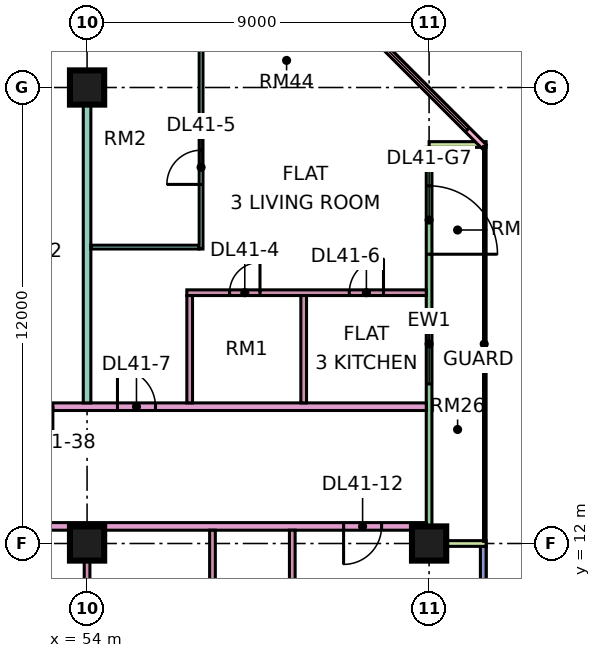
"""IFC4 building model, lengths in metres.
Left out: names, types, materials, properties, quantities, classifications, styles, units other than length and angle.
Written with IfcOpenShell. Run it as: python <this file> out.ifc"""

import sys

from ifc_helpers import new_model, si_unit, direction, frame, frame_2d, origin, origin_2d, place, context, subcontext, project, spatial, rectangle, extrude, element, fill, save


model = new_model("IFC4")
c1 = context("Model", 3, precision=1e-05, world=origin(), true_north=direction((0.0, 1.0)))
c2 = subcontext(c1, "Body", "Model", "MODEL_VIEW")
j1 = project(units=[si_unit("LENGTHUNIT", "METRE"), si_unit("PLANEANGLEUNIT", "RADIAN")], contexts=[c1])
p1 = place(None, origin())
s1 = spatial("IfcSite", under=j1, at=p1, CompositionType="ELEMENT")
p2 = place(p1, origin())
s2 = spatial("IfcBuilding", under=s1, at=p2, CompositionType="ELEMENT")
p3 = place(p2, frame((0.0, 0.0, 179.9)))
s3 = spatial("IfcBuildingStorey", under=s2, at=p3, CompositionType="ELEMENT", Elevation=179.9)
for number, where, z_axis, x_axis in (
    (1, (54.0, 12.0, 0.0), (0.0, 0.0, 1.0), (1.0, 0.0, 0.0)),
    (2, (54.0, 24.0, 0.0), (0.0, 0.0, 1.0), (1.0, 0.0, 0.0)),
    (3, (63.0, 12.0, 0.0), (0.0, 0.0, 1.0), (1.0, 0.0, 0.0)),
):
    element("IfcColumn", number, at=place(p3, frame(where, z_axis=z_axis, x_axis=x_axis)), inside=s3, PredefinedType="COLUMN", context=c2, shape_type="SweptSolid", body=[
        extrude(rectangle(XDim=0.9, YDim=0.9, at=origin_2d()), origin(), (0.0, 0.0, 1.0), 3.75),
    ])
p4 = place(p3, frame((64.425, 1.5, 0.0), z_axis=(0.0, 0.0, 1.0), x_axis=(0.0, 1.0, 0.0)))
e4 = element("IfcWall", 4, at=p4, inside=s3, PredefinedType="SOLIDWALL", context=c2, shape_type="SweptSolid", body=[
    extrude(rectangle(XDim=10.425, YDim=0.15, at=frame_2d((5.212, 0.0))), origin(), (0.0, 0.0, 1.0), 3.35),
])
p5 = place(p4, frame((0.75, 0.0, 0.45)))
e5 = element("IfcOpeningElement", 5, at=p5, cuts=e4, PredefinedType="OPENING", context=c2, shape_type="SweptSolid", body=[
    extrude(rectangle(XDim=3.0, YDim=2.4, at=frame_2d((1.5, 1.2))), frame((0.0, 0.085, 0.0), z_axis=(0.0, -1.0, 0.0), x_axis=(1.0, 0.0, 0.0)), (0.0, 0.0, 1.0), 0.17),
])
p6 = place(p3, frame((63.0, 12.075, 0.0), z_axis=(0.0, 0.0, 1.0), x_axis=(0.0, 1.0, 0.0)))
e6 = element("IfcWall", 6, at=p6, inside=s3, PredefinedType="SOLIDWALL", context=c2, shape_type="SweptSolid", body=[
    extrude(rectangle(XDim=10.35, YDim=0.15, at=frame_2d((5.175, 0.0))), origin(), (0.0, 0.0, 1.0), 3.35),
])
p7 = place(p6, frame((4.125, 0.0, 0.45)))
e7 = element("IfcOpeningElement", 7, at=p7, cuts=e6, PredefinedType="OPENING", context=c2, shape_type="SweptSolid", body=[
    extrude(rectangle(XDim=1.8, YDim=2.4, at=frame_2d((0.9, 1.2))), frame((0.0, 0.085, 0.0), z_axis=(0.0, -1.0, 0.0), x_axis=(1.0, 0.0, 0.0)), (0.0, 0.0, 1.0), 0.17),
])
p8 = place(p6, frame((7.538, 0.0, 0.0)))
e8 = element("IfcOpeningElement", 8, at=p8, cuts=e6, PredefinedType="OPENING", context=c2, shape_type="SweptSolid", body=[
    extrude(rectangle(XDim=1.8, YDim=2.4, at=frame_2d((0.9, 1.2))), frame((0.0, 0.085, 0.0), z_axis=(0.0, -1.0, 0.0), x_axis=(1.0, 0.0, 0.0)), (0.0, 0.0, 1.0), 0.17),
])
for number, where, z_axis, x_axis in (
    (9, (64.5, 12.0, 0.0), (0.0, 0.0, 1.0), (-1.0, 0.0, 0.0)),
    (10, (64.5, 22.5, 0.0), (0.0, 0.0, 1.0), (-1.0, 0.0, 0.0)),
):
    element("IfcWall", number, at=place(p3, frame(where, z_axis=z_axis, x_axis=x_axis)), inside=s3, PredefinedType="SOLIDWALL", context=c2, shape_type="SweptSolid", body=[
        extrude(rectangle(XDim=1.5, YDim=0.15, at=frame_2d((0.75, 0.0))), origin(), (0.0, 0.0, 1.0), 3.35),
    ])
p9 = place(p3, frame((64.447, 22.447, 0.0), z_axis=(0.0, 0.0, 1.0), x_axis=(-0.707106781187, 0.707106781187, 0.0)))
e11 = element("IfcWall", 11, at=p9, inside=s3, PredefinedType="SOLIDWALL", context=c2, shape_type="SweptSolid", body=[
    extrude(rectangle(XDim=4.243, YDim=0.15, at=frame_2d((2.121, 0.0))), origin(), (0.0, 0.0, 1.0), 3.35),
])
p10 = place(p9, frame((0.621, 0.0, 0.45)))
e12 = element("IfcOpeningElement", 12, at=p10, cuts=e11, PredefinedType="OPENING", context=c2, shape_type="SweptSolid", body=[
    extrude(rectangle(XDim=3.0, YDim=2.4, at=frame_2d((1.5, 1.2))), frame((0.0, 0.085, 0.0), z_axis=(0.0, -1.0, 0.0), x_axis=(1.0, 0.0, 0.0)), (0.0, 0.0, 1.0), 0.17),
])
p11 = place(p3, frame((40.65, 12.45, 0.0), z_axis=(0.0, 0.0, 1.0), x_axis=(1.0, 0.0, 0.0)))
e13 = element("IfcWall", 13, at=p11, inside=s3, PredefinedType="PARTITIONING", context=c2, shape_type="SweptSolid", body=[
    extrude(rectangle(XDim=22.276, YDim=0.2, at=frame_2d((11.138, 0.0))), origin(), (0.0, 0.0, 1.0), 3.35),
])
p12 = place(p11, frame((20.1, 0.0, 0.0)))
e14 = element("IfcOpeningElement", 14, at=p12, cuts=e13, PredefinedType="OPENING", context=c2, shape_type="SweptSolid", body=[
    extrude(rectangle(XDim=1.0, YDim=2.1, at=frame_2d((0.5, 1.05))), frame((0.0, 0.11, 0.0), z_axis=(0.0, -1.0, 0.0), x_axis=(1.0, 0.0, 0.0)), (0.0, 0.0, 1.0), 0.22),
])
p13 = place(p11, frame((1.05, 0.0, 0.0)))
e15 = element("IfcOpeningElement", 15, at=p13, cuts=e13, PredefinedType="OPENING", context=c2, shape_type="SweptSolid", body=[
    extrude(rectangle(XDim=1.0, YDim=2.1, at=frame_2d((0.5, 1.05))), frame((0.0, 0.11, 0.0), z_axis=(0.0, -1.0, 0.0), x_axis=(1.0, 0.0, 0.0)), (0.0, 0.0, 1.0), 0.22),
])
p14 = place(p3, frame((51.225, 15.6, 0.0), z_axis=(0.0, 0.0, 1.0), x_axis=(1.0, 0.0, 0.0)))
e16 = element("IfcWall", 16, at=p14, inside=s3, PredefinedType="PARTITIONING", context=c2, shape_type="SweptSolid", body=[
    extrude(rectangle(XDim=11.701, YDim=0.2, at=frame_2d((5.851, 0.0))), origin(), (0.0, 0.0, 1.0), 3.35),
])
p15 = place(p14, frame((3.575, 0.0, 0.0)))
e17 = element("IfcOpeningElement", 17, at=p15, cuts=e16, PredefinedType="OPENING", context=c2, shape_type="SweptSolid", body=[
    extrude(rectangle(XDim=1.0, YDim=2.1, at=frame_2d((0.5, 1.05))), frame((0.0, 0.11, 0.0), z_axis=(0.0, -1.0, 0.0), x_axis=(1.0, 0.0, 0.0)), (0.0, 0.0, 1.0), 0.22),
])
p16 = place(p14, frame((0.875, 0.0, 0.0)))
e18 = element("IfcOpeningElement", 18, at=p16, cuts=e16, PredefinedType="OPENING", context=c2, shape_type="SweptSolid", body=[
    extrude(rectangle(XDim=1.0, YDim=2.1, at=frame_2d((0.5, 1.05))), frame((0.0, 0.11, 0.0), z_axis=(0.0, -1.0, 0.0), x_axis=(1.0, 0.0, 0.0)), (0.0, 0.0, 1.0), 0.22),
])
p17 = place(p3, frame((54.0, 7.125, 0.0), z_axis=(0.0, 0.0, 1.0), x_axis=(0.0, 1.0, 0.0)))
e19 = element("IfcWall", 19, at=p17, inside=s3, PredefinedType="PARTITIONING", context=c2, shape_type="SweptSolid", body=[
    extrude(rectangle(XDim=5.225, YDim=0.15, at=frame_2d((2.613, 0.0))), origin(), (0.0, 0.0, 1.0), 3.35),
])
p18 = place(p3, frame((54.0, 15.7, 0.0), z_axis=(0.0, 0.0, 1.0), x_axis=(0.0, 1.0, 0.0)))
e20 = element("IfcWall", 20, at=p18, inside=s3, PredefinedType="PARTITIONING", context=c2, shape_type="SweptSolid", body=[
    extrude(rectangle(XDim=8.3, YDim=0.2, at=frame_2d((4.15, 0.0))), origin(), (0.0, 0.0, 1.0), 3.35),
])
p19 = place(p3, frame((54.1, 19.8, 0.0), z_axis=(0.0, 0.0, 1.0), x_axis=(1.0, 0.0, 0.0)))
e21 = element("IfcWall", 21, at=p19, inside=s3, PredefinedType="PARTITIONING", context=c2, shape_type="SweptSolid", body=[
    extrude(rectangle(XDim=2.85, YDim=0.1, at=frame_2d((1.425, 0.0))), origin(), (0.0, 0.0, 1.0), 3.35),
])
p20 = place(p3, frame((56.625, 18.6, 0.0), z_axis=(0.0, 0.0, 1.0), x_axis=(1.0, 0.0, 0.0)))
e22 = element("IfcWall", 22, at=p20, inside=s3, PredefinedType="PARTITIONING", context=c2, shape_type="SweptSolid", body=[
    extrude(rectangle(XDim=6.301, YDim=0.15, at=frame_2d((3.15, 0.0))), origin(), (0.0, 0.0, 1.0), 3.35),
])
p21 = place(p20, frame((1.125, 0.0, 0.0)))
e23 = element("IfcOpeningElement", 23, at=p21, cuts=e22, PredefinedType="OPENING", context=c2, shape_type="SweptSolid", body=[
    extrude(rectangle(XDim=0.8, YDim=2.1, at=frame_2d((0.4, 1.05))), frame((0.0, 0.085, 0.0), z_axis=(0.0, -1.0, 0.0), x_axis=(1.0, 0.0, 0.0)), (0.0, 0.0, 1.0), 0.17),
])
p22 = place(p20, frame((4.275, 0.0, 0.0)))
e24 = element("IfcOpeningElement", 24, at=p22, cuts=e22, PredefinedType="OPENING", context=c2, shape_type="SweptSolid", body=[
    extrude(rectangle(XDim=0.9, YDim=2.1, at=frame_2d((0.45, 1.05))), frame((0.0, 0.085, 0.0), z_axis=(0.0, -1.0, 0.0), x_axis=(1.0, 0.0, 0.0)), (0.0, 0.0, 1.0), 0.17),
])
p23 = place(p3, frame((56.7, 15.7, 0.0), z_axis=(0.0, 0.0, 1.0), x_axis=(0.0, 1.0, 0.0)))
e25 = element("IfcWall", 25, at=p23, inside=s3, PredefinedType="PARTITIONING", context=c2, shape_type="SweptSolid", body=[
    extrude(rectangle(XDim=2.825, YDim=0.15, at=frame_2d((1.413, 0.0))), origin(), (0.0, 0.0, 1.0), 3.35),
])
p24 = place(p3, frame((57.0, 19.75, 0.0), z_axis=(0.0, 0.0, 1.0), x_axis=(0.0, 1.0, 0.0)))
e26 = element("IfcWall", 26, at=p24, inside=s3, PredefinedType="PARTITIONING", context=c2, shape_type="SweptSolid", body=[
    extrude(rectangle(XDim=5.6, YDim=0.1, at=frame_2d((2.8, 0.0))), origin(), (0.0, 0.0, 1.0), 3.35),
])
p25 = place(p24, frame((1.7, 0.0, 0.0)))
e27 = element("IfcOpeningElement", 27, at=p25, cuts=e26, PredefinedType="OPENING", context=c2, shape_type="SweptSolid", body=[
    extrude(rectangle(XDim=0.9, YDim=2.1, at=frame_2d((0.45, 1.05))), frame((0.0, 0.06, 0.0), z_axis=(0.0, -1.0, 0.0), x_axis=(1.0, 0.0, 0.0)), (0.0, 0.0, 1.0), 0.12),
])
for number, where, z_axis, x_axis in (
    (28, (57.3, 7.125, 0.0), (0.0, 0.0, 1.0), (0.0, 1.0, 0.0)),
    (29, (59.4, 7.125, 0.0), (0.0, 0.0, 1.0), (0.0, 1.0, 0.0)),
):
    element("IfcWall", number, at=place(p3, frame(where, z_axis=z_axis, x_axis=x_axis)), inside=s3, PredefinedType="PARTITIONING", context=c2, shape_type="SweptSolid", body=[
        extrude(rectangle(XDim=5.225, YDim=0.15, at=frame_2d((2.613, 0.0))), origin(), (0.0, 0.0, 1.0), 3.35),
    ])
p26 = place(p3, frame((59.7, 15.7, 0.0), z_axis=(0.0, 0.0, 1.0), x_axis=(0.0, 1.0, 0.0)))
e30 = element("IfcWall", 30, at=p26, inside=s3, PredefinedType="PARTITIONING", context=c2, shape_type="SweptSolid", body=[
    extrude(rectangle(XDim=2.825, YDim=0.15, at=frame_2d((1.413, 0.0))), origin(), (0.0, 0.0, 1.0), 3.35),
])
p27 = place(p7, origin())
e31 = element("IfcWindow", 31, at=p27, inside=s3, PartitioningType="SINGLE_PANEL", PredefinedType="WINDOW", context=c2, shape_type="SweptSolid", body=[
    extrude(rectangle(XDim=1.8, YDim=2.4, at=frame_2d((0.9, 1.2))), frame((0.0, 0.03, 0.0), z_axis=(0.0, -1.0, 0.0), x_axis=(1.0, 0.0, 0.0)), (0.0, 0.0, 1.0), 0.06),
])
fill(e7, e31)
p28 = place(p8, frame((1.8, 0.0, 0.0), z_axis=(0.0, 0.0, 1.0), x_axis=(-1.0, 0.0, 0.0)))
e32 = element("IfcDoor", 32, at=p28, inside=s3, OperationType="DOUBLE_DOOR_SINGLE_SWING", PredefinedType="DOOR", context=c2, shape_type="SweptSolid", body=[
    extrude(rectangle(XDim=1.8, YDim=2.4, at=frame_2d((0.9, 1.2))), frame((0.0, 0.025, 0.0), z_axis=(0.0, -1.0, 0.0), x_axis=(1.0, 0.0, 0.0)), (0.0, 0.0, 1.0), 0.05),
])
fill(e8, e32)
p29 = place(p10, origin())
e33 = element("IfcWindow", 33, at=p29, inside=s3, PartitioningType="SINGLE_PANEL", PredefinedType="WINDOW", context=c2, shape_type="SweptSolid", body=[
    extrude(rectangle(XDim=3.0, YDim=2.4, at=frame_2d((1.5, 1.2))), frame((0.0, 0.03, 0.0), z_axis=(0.0, -1.0, 0.0), x_axis=(1.0, 0.0, 0.0)), (0.0, 0.0, 1.0), 0.06),
])
fill(e12, e33)
p30 = place(p21, frame((0.8, 0.0, 0.0), z_axis=(0.0, 0.0, 1.0), x_axis=(-1.0, 0.0, 0.0)))
e34 = element("IfcDoor", 34, at=p30, inside=s3, OperationType="SINGLE_SWING_RIGHT", PredefinedType="DOOR", context=c2, shape_type="SweptSolid", body=[
    extrude(rectangle(XDim=0.8, YDim=2.1, at=frame_2d((0.4, 1.05))), frame((0.0, 0.025, 0.0), z_axis=(0.0, -1.0, 0.0), x_axis=(1.0, 0.0, 0.0)), (0.0, 0.0, 1.0), 0.05),
])
fill(e23, e34)
p31 = place(p25, origin())
e35 = element("IfcDoor", 35, at=p31, inside=s3, OperationType="SINGLE_SWING_LEFT", PredefinedType="DOOR", context=c2, shape_type="SweptSolid", body=[
    extrude(rectangle(XDim=0.9, YDim=2.1, at=frame_2d((0.45, 1.05))), frame((0.0, 0.025, 0.0), z_axis=(0.0, -1.0, 0.0), x_axis=(1.0, 0.0, 0.0)), (0.0, 0.0, 1.0), 0.05),
])
fill(e27, e35)
p32 = place(p22, frame((0.9, 0.0, 0.0), z_axis=(0.0, 0.0, 1.0), x_axis=(-1.0, 0.0, 0.0)))
e36 = element("IfcDoor", 36, at=p32, inside=s3, OperationType="SINGLE_SWING_RIGHT", PredefinedType="DOOR", context=c2, shape_type="SweptSolid", body=[
    extrude(rectangle(XDim=0.9, YDim=2.1, at=frame_2d((0.45, 1.05))), frame((0.0, 0.025, 0.0), z_axis=(0.0, -1.0, 0.0), x_axis=(1.0, 0.0, 0.0)), (0.0, 0.0, 1.0), 0.05),
])
fill(e24, e36)
p33 = place(p15, origin())
e37 = element("IfcDoor", 37, at=p33, inside=s3, OperationType="SINGLE_SWING_LEFT", PredefinedType="DOOR", context=c2, shape_type="SweptSolid", body=[
    extrude(rectangle(XDim=1.0, YDim=2.1, at=frame_2d((0.5, 1.05))), frame((0.0, 0.025, 0.0), z_axis=(0.0, -1.0, 0.0), x_axis=(1.0, 0.0, 0.0)), (0.0, 0.0, 1.0), 0.05),
])
fill(e17, e37)
p34 = place(p12, frame((1.0, 0.0, 0.0), z_axis=(0.0, 0.0, 1.0), x_axis=(-1.0, 0.0, 0.0)))
e38 = element("IfcDoor", 38, at=p34, inside=s3, OperationType="SINGLE_SWING_LEFT", PredefinedType="DOOR", context=c2, shape_type="SweptSolid", body=[
    extrude(rectangle(XDim=1.0, YDim=2.1, at=frame_2d((0.5, 1.05))), frame((0.0, 0.025, 0.0), z_axis=(0.0, -1.0, 0.0), x_axis=(1.0, 0.0, 0.0)), (0.0, 0.0, 1.0), 0.05),
])
fill(e14, e38)
p35 = place(p16, origin())
e39 = element("IfcDoor", 39, at=p35, inside=s3, OperationType="SINGLE_SWING_RIGHT", PredefinedType="DOOR", context=c2, shape_type="SweptSolid", body=[
    extrude(rectangle(XDim=1.0, YDim=2.1, at=frame_2d((0.5, 1.05))), frame((0.0, 0.025, 0.0), z_axis=(0.0, -1.0, 0.0), x_axis=(1.0, 0.0, 0.0)), (0.0, 0.0, 1.0), 0.05),
])
fill(e18, e39)
save(model, sys.argv[1])
